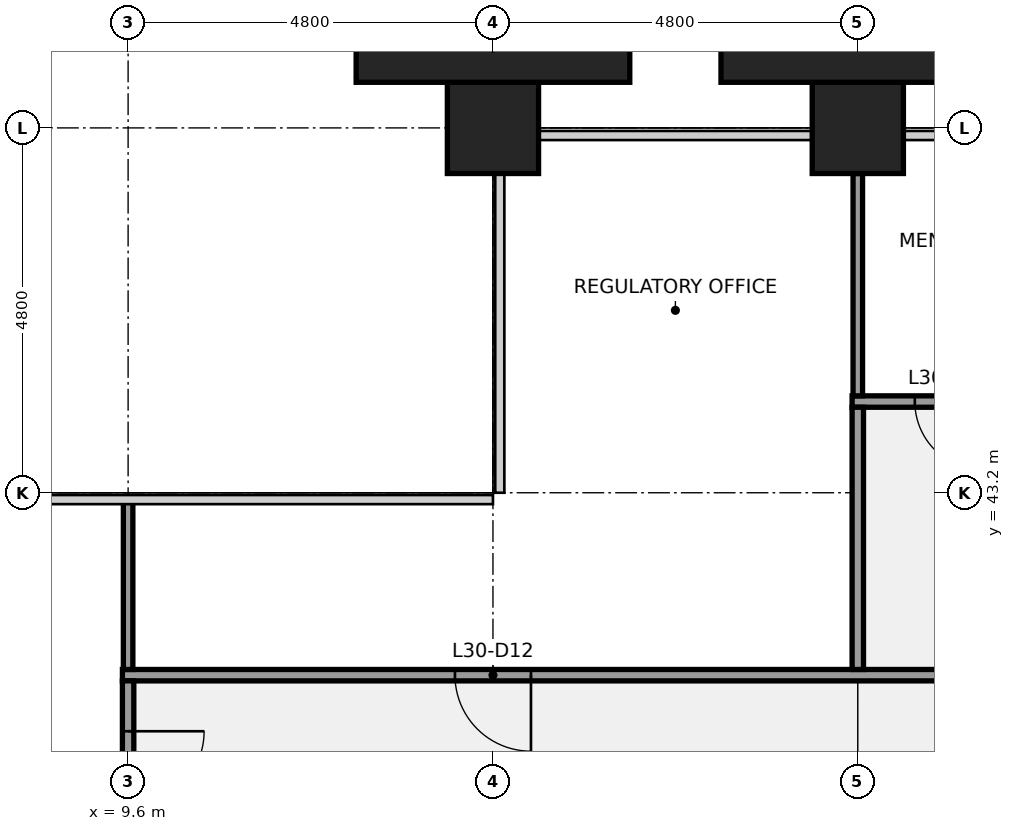
"""IFC4 building model, lengths in metres.
Left out: names, types, materials, properties, quantities, classifications, styles, units other than length and angle.
Written with IfcOpenShell. Run it as: python <this file> out.ifc"""

import sys

from ifc_helpers import new_model, si_unit, direction, frame, frame_2d, origin, origin_2d, place, context, subcontext, project, spatial, rectangle, extrude, element, fill, save


model = new_model("IFC4")
c1 = context("Model", 3, precision=1e-05, world=origin(), true_north=direction((0.0, 1.0)))
c2 = subcontext(c1, "Body", "Model", "MODEL_VIEW")
j1 = project(units=[si_unit("LENGTHUNIT", "METRE"), si_unit("PLANEANGLEUNIT", "RADIAN")], contexts=[c1])
p1 = place(None, origin())
s1 = spatial("IfcSite", under=j1, at=p1, CompositionType="ELEMENT")
p2 = place(p1, origin())
s2 = spatial("IfcBuilding", under=s1, at=p2, CompositionType="ELEMENT")
p3 = place(p2, frame((0.0, 0.0, 140.1)))
s3 = spatial("IfcBuildingStorey", under=s2, at=p3, CompositionType="ELEMENT", Elevation=140.1)
for number, where, z_axis, x_axis in (
    (1, (14.4, 48.0, 0.0), (0.0, 0.0, 1.0), (1.0, 0.0, 0.0)),
    (2, (19.2, 48.0, 0.0), (0.0, 0.0, 1.0), (1.0, 0.0, 0.0)),
):
    element("IfcColumn", number, at=place(p3, frame(where, z_axis=z_axis, x_axis=x_axis)), inside=s3, PredefinedType="COLUMN", context=c2, shape_type="SweptSolid", body=[
        extrude(rectangle(XDim=1.2, YDim=1.2, at=origin_2d()), origin(), (0.0, 0.0, 1.0), 4.0),
    ])
p4 = place(p3, frame((9.525, 40.8, 0.0), z_axis=(0.0, 0.0, 1.0), x_axis=(1.0, 0.0, 0.0)))
e3 = element("IfcWall", 3, at=p4, inside=s3, PredefinedType="PARTITIONING", context=c2, shape_type="SweptSolid", body=[
    extrude(rectangle(XDim=38.55, YDim=0.15, at=frame_2d((19.275, 0.0))), origin(), (0.0, 0.0, 1.0), 2.936),
])
p5 = place(p4, frame((4.375, 0.0, 0.0)))
e4 = element("IfcOpeningElement", 4, at=p5, cuts=e3, PredefinedType="OPENING", context=c2, shape_type="SweptSolid", body=[
    extrude(rectangle(XDim=1.0, YDim=2.1, at=frame_2d((0.5, 1.05))), frame((0.0, 0.085, 0.0), z_axis=(0.0, -1.0, 0.0), x_axis=(1.0, 0.0, 0.0)), (0.0, 0.0, 1.0), 0.17),
])
p6 = place(p4, frame((12.775, 0.0, 0.0)))
e5 = element("IfcOpeningElement", 5, at=p6, cuts=e3, PredefinedType="OPENING", context=c2, shape_type="SweptSolid", body=[
    extrude(rectangle(XDim=1.0, YDim=2.1, at=frame_2d((0.5, 1.05))), frame((0.0, 0.085, 0.0), z_axis=(0.0, -1.0, 0.0), x_axis=(1.0, 0.0, 0.0)), (0.0, 0.0, 1.0), 0.17),
])
p7 = place(p4, frame((17.575, 0.0, 0.0)))
e6 = element("IfcOpeningElement", 6, at=p7, cuts=e3, PredefinedType="OPENING", context=c2, shape_type="SweptSolid", body=[
    extrude(rectangle(XDim=1.0, YDim=2.1, at=frame_2d((0.5, 1.05))), frame((0.0, 0.085, 0.0), z_axis=(0.0, -1.0, 0.0), x_axis=(1.0, 0.0, 0.0)), (0.0, 0.0, 1.0), 0.17),
])
p8 = place(p4, frame((19.975, 0.0, 0.0)))
e7 = element("IfcOpeningElement", 7, at=p8, cuts=e3, PredefinedType="OPENING", context=c2, shape_type="SweptSolid", body=[
    extrude(rectangle(XDim=1.0, YDim=2.1, at=frame_2d((0.5, 1.05))), frame((0.0, 0.085, 0.0), z_axis=(0.0, -1.0, 0.0), x_axis=(1.0, 0.0, 0.0)), (0.0, 0.0, 1.0), 0.17),
])
p9 = place(p4, frame((23.575, 0.0, 0.0)))
e8 = element("IfcOpeningElement", 8, at=p9, cuts=e3, PredefinedType="OPENING", context=c2, shape_type="SweptSolid", body=[
    extrude(rectangle(XDim=1.0, YDim=2.1, at=frame_2d((0.5, 1.05))), frame((0.0, 0.085, 0.0), z_axis=(0.0, -1.0, 0.0), x_axis=(1.0, 0.0, 0.0)), (0.0, 0.0, 1.0), 0.17),
])
p10 = place(p4, frame((27.175, 0.0, 0.0)))
e9 = element("IfcOpeningElement", 9, at=p10, cuts=e3, PredefinedType="OPENING", context=c2, shape_type="SweptSolid", body=[
    extrude(rectangle(XDim=1.0, YDim=2.1, at=frame_2d((0.5, 1.05))), frame((0.0, 0.085, 0.0), z_axis=(0.0, -1.0, 0.0), x_axis=(1.0, 0.0, 0.0)), (0.0, 0.0, 1.0), 0.17),
])
p11 = place(p4, frame((33.175, 0.0, 0.0)))
e10 = element("IfcOpeningElement", 10, at=p11, cuts=e3, PredefinedType="OPENING", context=c2, shape_type="SweptSolid", body=[
    extrude(rectangle(XDim=1.0, YDim=2.1, at=frame_2d((0.5, 1.05))), frame((0.0, 0.085, 0.0), z_axis=(0.0, -1.0, 0.0), x_axis=(1.0, 0.0, 0.0)), (0.0, 0.0, 1.0), 0.17),
])
p12 = place(p3, frame((19.125, 44.4, 0.0), z_axis=(0.0, 0.0, 1.0), x_axis=(1.0, 0.0, 0.0)))
e11 = element("IfcWall", 11, at=p12, inside=s3, PredefinedType="PARTITIONING", context=c2, shape_type="SweptSolid", body=[
    extrude(rectangle(XDim=7.35, YDim=0.15, at=frame_2d((3.675, 0.0))), origin(), (0.0, 0.0, 1.0), 2.936),
])
p13 = place(p12, frame((0.825, 0.0, 0.0)))
e12 = element("IfcOpeningElement", 12, at=p13, cuts=e11, PredefinedType="OPENING", context=c2, shape_type="SweptSolid", body=[
    extrude(rectangle(XDim=0.9, YDim=2.1, at=frame_2d((0.45, 1.05))), frame((0.0, 0.085, 0.0), z_axis=(0.0, -1.0, 0.0), x_axis=(1.0, 0.0, 0.0)), (0.0, 0.0, 1.0), 0.17),
])
p14 = place(p12, frame((3.225, 0.0, 0.0)))
e13 = element("IfcOpeningElement", 13, at=p14, cuts=e11, PredefinedType="OPENING", context=c2, shape_type="SweptSolid", body=[
    extrude(rectangle(XDim=0.9, YDim=2.1, at=frame_2d((0.45, 1.05))), frame((0.0, 0.085, 0.0), z_axis=(0.0, -1.0, 0.0), x_axis=(1.0, 0.0, 0.0)), (0.0, 0.0, 1.0), 0.17),
])
p15 = place(p12, frame((5.475, 0.0, 0.0)))
e14 = element("IfcOpeningElement", 14, at=p15, cuts=e11, PredefinedType="OPENING", context=c2, shape_type="SweptSolid", body=[
    extrude(rectangle(XDim=1.2, YDim=2.1, at=frame_2d((0.6, 1.05))), frame((0.0, 0.085, 0.0), z_axis=(0.0, -1.0, 0.0), x_axis=(1.0, 0.0, 0.0)), (0.0, 0.0, 1.0), 0.17),
])
p16 = place(p3, frame((9.6, 40.875, 0.0), z_axis=(0.0, 0.0, 1.0), x_axis=(0.0, 1.0, 0.0)))
e15 = element("IfcWall", 15, at=p16, inside=s3, PredefinedType="PARTITIONING", context=c2, shape_type="SweptSolid", body=[
    extrude(rectangle(XDim=2.225, YDim=0.125, at=frame_2d((1.113, 0.0))), origin(), (0.0, 0.0, 1.0), 2.936),
])
p17 = place(p3, frame((9.6, 38.4, 0.0), z_axis=(0.0, 0.0, 1.0), x_axis=(0.0, 1.0, 0.0)))
e16 = element("IfcWall", 16, at=p17, inside=s3, PredefinedType="PARTITIONING", context=c2, shape_type="SweptSolid", body=[
    extrude(rectangle(XDim=2.325, YDim=0.15, at=frame_2d((1.163, 0.0))), origin(), (0.0, 0.0, 1.0), 2.936),
])
p18 = place(p17, frame((0.663, 0.0, 0.0)))
e17 = element("IfcOpeningElement", 17, at=p18, cuts=e16, PredefinedType="OPENING", context=c2, shape_type="SweptSolid", body=[
    extrude(rectangle(XDim=1.0, YDim=2.1, at=frame_2d((0.5, 1.05))), frame((0.0, 0.085, 0.0), z_axis=(0.0, -1.0, 0.0), x_axis=(1.0, 0.0, 0.0)), (0.0, 0.0, 1.0), 0.17),
])
p19 = place(p3, frame((19.2, 44.475, 0.0), z_axis=(0.0, 0.0, 1.0), x_axis=(0.0, 1.0, 0.0)))
e18 = element("IfcWall", 18, at=p19, inside=s3, PredefinedType="PARTITIONING", context=c2, shape_type="SweptSolid", body=[
    extrude(rectangle(XDim=2.925, YDim=0.125, at=frame_2d((1.462, 0.0))), origin(), (0.0, 0.0, 1.0), 2.936),
])
p20 = place(p3, frame((19.2, 40.875, 0.0), z_axis=(0.0, 0.0, 1.0), x_axis=(0.0, 1.0, 0.0)))
e19 = element("IfcWall", 19, at=p20, inside=s3, PredefinedType="PARTITIONING", context=c2, shape_type="SweptSolid", body=[
    extrude(rectangle(XDim=3.45, YDim=0.15, at=frame_2d((1.725, 0.0))), origin(), (0.0, 0.0, 1.0), 2.936),
])
for number, where, z_axis, x_axis in (
    (20, (14.4, 49.05, 0.0), (0.0, 0.0, 1.0), (1.0, 0.0, 0.0)),
    (21, (19.2, 49.05, 0.0), (0.0, 0.0, 1.0), (1.0, 0.0, 0.0)),
):
    element("IfcColumn", number, at=place(p3, frame(where, z_axis=z_axis, x_axis=x_axis)), inside=s3, PredefinedType="PILASTER", context=c2, shape_type="SweptSolid", body=[
        extrude(rectangle(XDim=3.6, YDim=0.9, at=origin_2d()), origin(), (0.0, 0.0, 1.0), 4.0),
    ])
p21 = place(p5, origin())
e22 = element("IfcDoor", 22, at=p21, inside=s3, OperationType="SINGLE_SWING_RIGHT", PredefinedType="DOOR", context=c2, shape_type="SweptSolid", body=[
    extrude(rectangle(XDim=1.0, YDim=2.1, at=frame_2d((0.5, 1.05))), frame((0.0, 0.025, 0.0), z_axis=(0.0, -1.0, 0.0), x_axis=(1.0, 0.0, 0.0)), (0.0, 0.0, 1.0), 0.05),
])
fill(e4, e22)
p22 = place(p13, origin())
e23 = element("IfcDoor", 23, at=p22, inside=s3, OperationType="SINGLE_SWING_RIGHT", PredefinedType="DOOR", context=c2, shape_type="SweptSolid", body=[
    extrude(rectangle(XDim=0.9, YDim=2.1, at=frame_2d((0.45, 1.05))), frame((0.0, 0.025, 0.0), z_axis=(0.0, -1.0, 0.0), x_axis=(1.0, 0.0, 0.0)), (0.0, 0.0, 1.0), 0.05),
])
fill(e12, e23)
p23 = place(p18, origin())
e24 = element("IfcDoor", 24, at=p23, inside=s3, OperationType="SINGLE_SWING_RIGHT", PredefinedType="DOOR", context=c2, shape_type="SweptSolid", body=[
    extrude(rectangle(XDim=1.0, YDim=2.1, at=frame_2d((0.5, 1.05))), frame((0.0, 0.025, 0.0), z_axis=(0.0, -1.0, 0.0), x_axis=(1.0, 0.0, 0.0)), (0.0, 0.0, 1.0), 0.05),
])
fill(e17, e24)
save(model, sys.argv[1])
